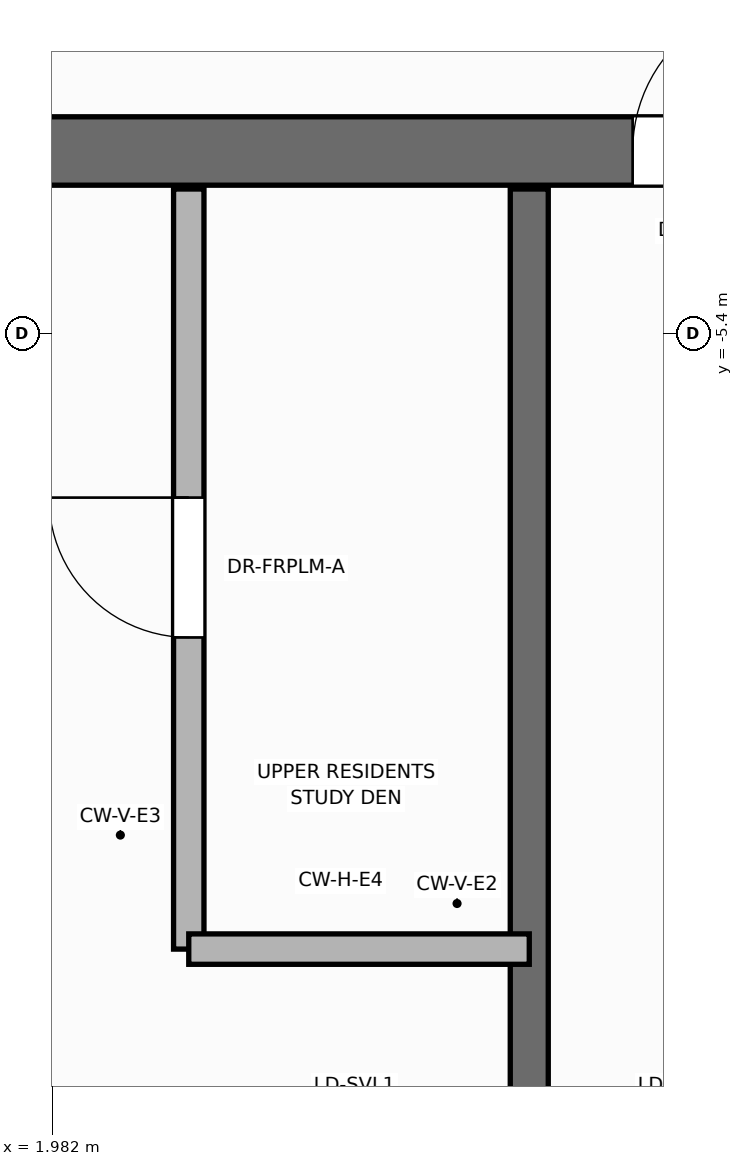
"""IFC4 building model, lengths in metres.
Left out: names, types, materials, properties, quantities, classifications, styles, units other than length and angle.
Written with IfcOpenShell. Run it as: python <this file> out.ifc"""

import sys

from ifc_helpers import new_model, si_unit, direction, frame, frame_2d, origin, place, context, subcontext, project, spatial, rectangle, extrude, element, fill, save


model = new_model("IFC4")
c1 = context("Model", 3, precision=1e-05, world=origin(), true_north=direction((0.0, 1.0)))
c2 = subcontext(c1, "Body", "Model", "MODEL_VIEW")
j1 = project(units=[si_unit("LENGTHUNIT", "METRE"), si_unit("PLANEANGLEUNIT", "RADIAN")], contexts=[c1])
p1 = place(None, origin())
s1 = spatial("IfcSite", under=j1, at=p1, CompositionType="ELEMENT")
p2 = place(p1, origin())
s2 = spatial("IfcBuilding", under=s1, at=p2, CompositionType="ELEMENT")
p3 = place(p2, frame((0.0, 0.0, 301.8)))
s3 = spatial("IfcBuildingStorey", under=s2, at=p3, CompositionType="ELEMENT", Elevation=301.8)
p4 = place(p3, frame((-12.65, -4.2, 0.0), z_axis=(0.0, 0.0, 1.0), x_axis=(1.0, 0.0, 0.0)))
e1 = element("IfcWall", 1, at=p4, inside=s3, PredefinedType="SHEAR", context=c2, shape_type="SweptSolid", body=[
    extrude(rectangle(XDim=25.3, YDim=0.45, at=frame_2d((12.65, 0.0))), origin(), (0.0, 0.0, 1.0), 4.2),
])
p5 = place(p4, frame((1.85, 0.0, 0.0)))
e2 = element("IfcOpeningElement", 2, at=p5, cuts=e1, PredefinedType="OPENING", context=c2, shape_type="SweptSolid", body=[
    extrude(rectangle(XDim=0.756, YDim=2.054, at=frame_2d((0.375, 1.027))), frame((0.0, 0.235, 0.0), z_axis=(0.0, -1.0, 0.0), x_axis=(1.0, 0.0, 0.0)), (0.0, 0.0, 1.0), 0.47),
])
p6 = place(p4, frame((21.85, 0.0, 0.0)))
e3 = element("IfcOpeningElement", 3, at=p6, cuts=e1, PredefinedType="OPENING", context=c2, shape_type="SweptSolid", body=[
    extrude(rectangle(XDim=0.756, YDim=2.054, at=frame_2d((0.375, 1.027))), frame((0.0, 0.235, 0.0), z_axis=(0.0, -1.0, 0.0), x_axis=(1.0, 0.0, 0.0)), (0.0, 0.0, 1.0), 0.47),
])
p7 = place(p4, frame((23.5, 0.0, 0.0)))
e4 = element("IfcOpeningElement", 4, at=p7, cuts=e1, PredefinedType="OPENING", context=c2, shape_type="SweptSolid", body=[
    extrude(rectangle(XDim=0.756, YDim=2.054, at=frame_2d((0.375, 1.027))), frame((0.0, 0.235, 0.0), z_axis=(0.0, -1.0, 0.0), x_axis=(1.0, 0.0, 0.0)), (0.0, 0.0, 1.0), 0.47),
])
p8 = place(p4, frame((5.85, 0.0, 0.0)))
e5 = element("IfcOpeningElement", 5, at=p8, cuts=e1, PredefinedType="OPENING", context=c2, shape_type="SweptSolid", body=[
    extrude(rectangle(XDim=1.006, YDim=2.104, at=frame_2d((0.5, 1.052))), frame((0.0, 0.235, 0.0), z_axis=(0.0, -1.0, 0.0), x_axis=(1.0, 0.0, 0.0)), (0.0, 0.0, 1.0), 0.47),
])
p9 = place(p4, frame((10.35, 0.0, 0.0)))
e6 = element("IfcOpeningElement", 6, at=p9, cuts=e1, PredefinedType="OPENING", context=c2, shape_type="SweptSolid", body=[
    extrude(rectangle(XDim=1.406, YDim=2.154, at=frame_2d((0.7, 1.077))), frame((0.0, 0.235, 0.0), z_axis=(0.0, -1.0, 0.0), x_axis=(1.0, 0.0, 0.0)), (0.0, 0.0, 1.0), 0.47),
])
p10 = place(p4, frame((18.45, 0.0, 0.0)))
e7 = element("IfcOpeningElement", 7, at=p10, cuts=e1, PredefinedType="OPENING", context=c2, shape_type="SweptSolid", body=[
    extrude(rectangle(XDim=1.006, YDim=2.104, at=frame_2d((0.5, 1.052))), frame((0.0, 0.235, 0.0), z_axis=(0.0, -1.0, 0.0), x_axis=(1.0, 0.0, 0.0)), (0.0, 0.0, 1.0), 0.47),
])
p11 = place(p3, frame((5.12, -13.85, 0.0), z_axis=(0.0, 0.0, 1.0), x_axis=(0.0, 1.0, 0.0)))
e8 = element("IfcWall", 8, at=p11, inside=s3, PredefinedType="SHEAR", context=c2, shape_type="SweptSolid", body=[
    extrude(rectangle(XDim=9.4, YDim=0.25, at=frame_2d((4.7, 0.0))), origin(), (0.0, 0.0, 1.0), 4.2),
])
p12 = place(p3, frame((2.88, -9.45, 0.0), z_axis=(0.0, 0.0, 1.0), x_axis=(0.0, 1.0, 0.0)))
e9 = element("IfcWall", 9, at=p12, inside=s3, PredefinedType="SOLIDWALL", context=c2, shape_type="SweptSolid", body=[
    extrude(rectangle(XDim=5.0, YDim=0.2, at=frame_2d((2.5, 0.0))), origin(), (0.0, 0.0, 1.0), 3.88),
])
p13 = place(p12, frame((2.05, 0.0, 0.0)))
e10 = element("IfcOpeningElement", 10, at=p13, cuts=e9, PredefinedType="OPENING", context=c2, shape_type="SweptSolid", body=[
    extrude(rectangle(XDim=0.926, YDim=2.104, at=frame_2d((0.46, 1.052))), frame((0.0, 0.11, 0.0), z_axis=(0.0, -1.0, 0.0), x_axis=(1.0, 0.0, 0.0)), (0.0, 0.0, 1.0), 0.22),
])
p14 = place(p3, frame((2.88, -9.45, 0.0), z_axis=(0.0, 0.0, 1.0), x_axis=(1.0, 0.0, 0.0)))
e11 = element("IfcWall", 11, at=p14, inside=s3, PredefinedType="SOLIDWALL", context=c2, shape_type="SweptSolid", body=[
    extrude(rectangle(XDim=2.24, YDim=0.2, at=frame_2d((1.12, 0.0))), origin(), (0.0, 0.0, 1.0), 3.88),
])
p15 = place(p13, origin())
e12 = element("IfcDoor", 12, at=p15, inside=s3, OperationType="SINGLE_SWING_RIGHT", PredefinedType="DOOR", context=c2, shape_type="SweptSolid", body=[
    extrude(rectangle(XDim=0.92, YDim=2.1, at=frame_2d((0.46, 1.05))), frame((0.0, 0.025, 0.0), z_axis=(0.0, -1.0, 0.0), x_axis=(1.0, 0.0, 0.0)), (0.0, 0.0, 1.0), 0.05),
])
fill(e10, e12)
p16 = place(p10, origin())
e13 = element("IfcDoor", 13, at=p16, inside=s3, OperationType="SINGLE_SWING_RIGHT", PredefinedType="DOOR", context=c2, shape_type="SweptSolid", body=[
    extrude(rectangle(XDim=1.0, YDim=2.1, at=frame_2d((0.5, 1.05))), frame((0.0, 0.025, 0.0), z_axis=(0.0, -1.0, 0.0), x_axis=(1.0, 0.0, 0.0)), (0.0, 0.0, 1.0), 0.05),
])
fill(e7, e13)
save(model, sys.argv[1])
